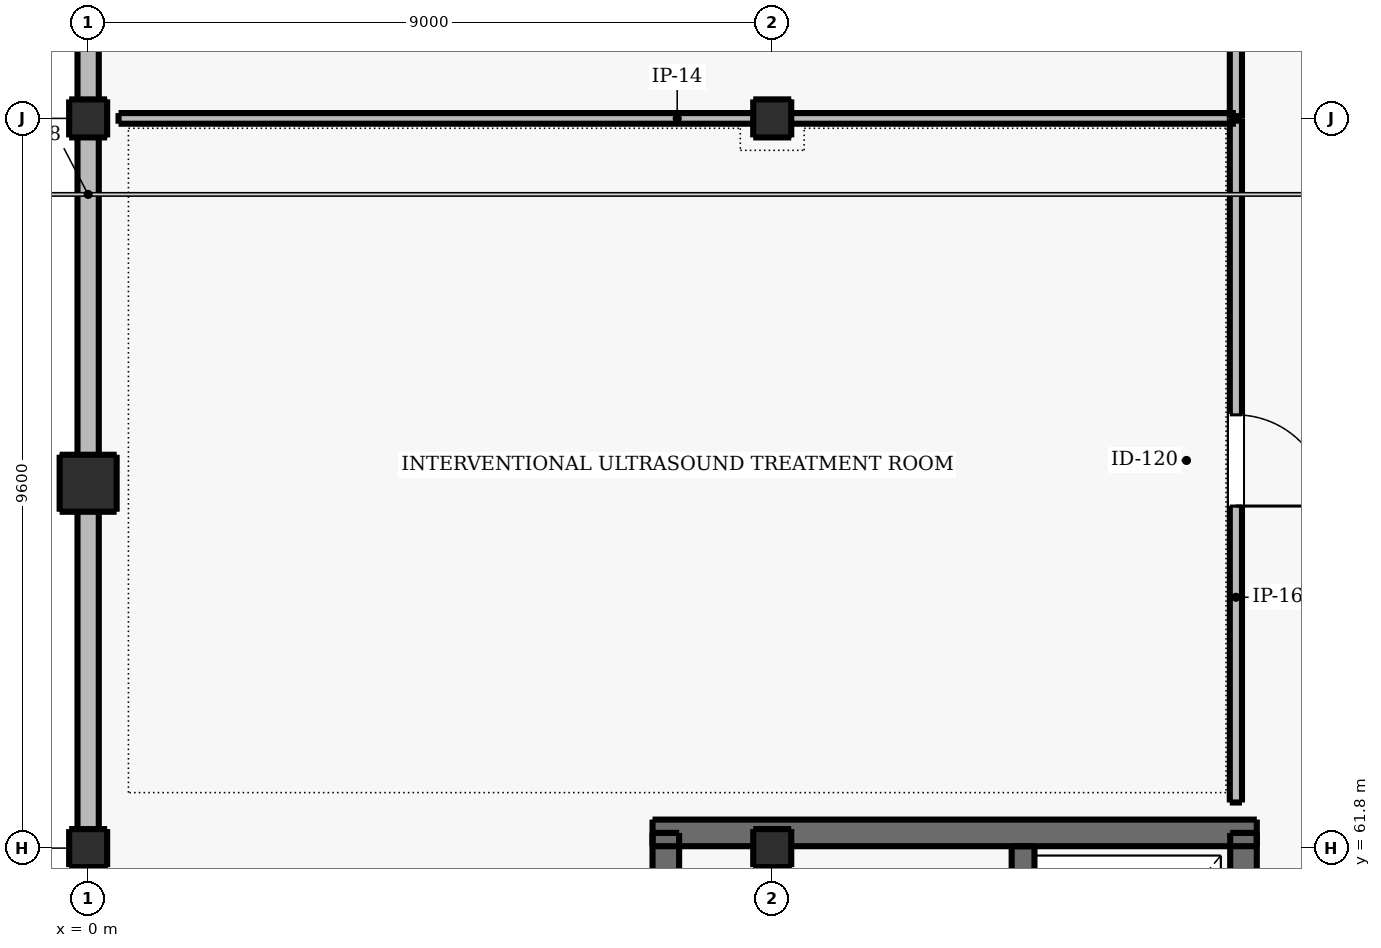
"""IFC4 building model, lengths in metres.
Left out: names, types, materials, properties, quantities, classifications, styles, units other than length and angle.
Written with IfcOpenShell. Run it as: python <this file> out.ifc"""

import sys

from ifc_helpers import new_model, si_unit, direction, frame, frame_2d, origin, origin_2d, place, context, subcontext, project, spatial, rectangle, extrude, element, fill, save


model = new_model("IFC4")
c1 = context("Model", 3, precision=1e-05, world=origin(), true_north=direction((0.0, 1.0)))
c2 = subcontext(c1, "Body", "Model", "MODEL_VIEW")
j1 = project(units=[si_unit("LENGTHUNIT", "METRE"), si_unit("PLANEANGLEUNIT", "RADIAN")], contexts=[c1])
p1 = place(None, origin())
s1 = spatial("IfcSite", under=j1, at=p1, CompositionType="ELEMENT")
p2 = place(p1, origin())
s2 = spatial("IfcBuilding", under=s1, at=p2, CompositionType="ELEMENT")
p3 = place(p2, frame((0.0, 0.0, 5.1)))
s3 = spatial("IfcBuildingStorey", under=s2, at=p3, CompositionType="ELEMENT", Elevation=5.1)
p4 = place(p3, frame((0.0, 61.8, 0.0), z_axis=(0.0, 0.0, 1.0), x_axis=(1.0, 0.0, 0.0)))
e1 = element("IfcColumn", 1, at=p4, inside=s3, PredefinedType="COLUMN", context=c2, shape_type="SweptSolid", body=[
    extrude(rectangle(XDim=0.5, YDim=0.5, at=origin_2d()), origin(), (0.0, 0.0, 1.0), 4.5),
])
p5 = place(p3, frame((0.0, 66.6, 0.0), z_axis=(0.0, 0.0, 1.0), x_axis=(1.0, 0.0, 0.0)))
e2 = element("IfcColumn", 2, at=p5, inside=s3, PredefinedType="PILASTER", context=c2, shape_type="SweptSolid", body=[
    extrude(rectangle(XDim=0.75, YDim=0.75, at=origin_2d()), origin(), (0.0, 0.0, 1.0), 4.5),
])
for number, where, z_axis, x_axis in (
    (3, (0.0, 71.4, 0.0), (0.0, 0.0, 1.0), (1.0, 0.0, 0.0)),
    (4, (9.0, 61.8, 0.0), (0.0, 0.0, 1.0), (1.0, 0.0, 0.0)),
    (5, (9.0, 71.4, 0.0), (0.0, 0.0, 1.0), (1.0, 0.0, 0.0)),
):
    element("IfcColumn", number, at=place(p3, frame(where, z_axis=z_axis, x_axis=x_axis)), inside=s3, PredefinedType="COLUMN", context=c2, shape_type="SweptSolid", body=[
        extrude(rectangle(XDim=0.5, YDim=0.5, at=origin_2d()), origin(), (0.0, 0.0, 1.0), 4.5),
    ])
p6 = place(p3, frame((7.425, 62.0, 0.0), z_axis=(0.0, 0.0, 1.0), x_axis=(1.0, 0.0, 0.0)))
e6 = element("IfcWall", 6, at=p6, inside=s3, PredefinedType="SHEAR", context=c2, shape_type="SweptSolid", body=[
    extrude(rectangle(XDim=7.95, YDim=0.35, at=frame_2d((3.975, 0.0))), origin(), (0.0, 0.0, 1.0), 4.5),
])
for number, where, z_axis, x_axis in (
    (7, (7.6, 54.8, 0.0), (0.0, 0.0, 1.0), (0.0, 1.0, 0.0)),
    (8, (15.2, 54.8, 0.0), (0.0, 0.0, 1.0), (0.0, 1.0, 0.0)),
):
    element("IfcWall", number, at=place(p3, frame(where, z_axis=z_axis, x_axis=x_axis)), inside=s3, PredefinedType="SHEAR", context=c2, shape_type="SweptSolid", body=[
        extrude(rectangle(XDim=7.2, YDim=0.35, at=frame_2d((3.6, 0.0))), origin(), (0.0, 0.0, 1.0), 4.5),
    ])
p7 = place(p3, frame((12.3, 58.5, 0.0), z_axis=(0.0, 0.0, 1.0), x_axis=(0.0, 1.0, 0.0)))
e9 = element("IfcWall", 9, at=p7, inside=s3, PredefinedType="SHEAR", context=c2, shape_type="SweptSolid", body=[
    extrude(rectangle(XDim=3.325, YDim=0.3, at=frame_2d((1.663, 0.0))), origin(), (0.0, 0.0, 1.0), 4.5),
])
p8 = place(p7, frame((1.113, 0.0, 0.0)))
e10 = element("IfcOpeningElement", 10, at=p8, cuts=e9, PredefinedType="OPENING", context=c2, shape_type="SweptSolid", body=[
    extrude(rectangle(XDim=1.1, YDim=2.15, at=frame_2d((0.55, 1.075))), frame((0.0, 0.16, 0.0), z_axis=(0.0, -1.0, 0.0), x_axis=(1.0, 0.0, 0.0)), (0.0, 0.0, 1.0), 0.32),
])
p9 = place(p3, frame((0.0, 45.0, 0.0), z_axis=(0.0, 0.0, 1.0), x_axis=(0.0, 1.0, 0.0)))
e11 = element("IfcWall", 11, at=p9, inside=s3, PredefinedType="SOLIDWALL", context=c2, shape_type="SweptSolid", body=[
    extrude(rectangle(XDim=50.8, YDim=0.28, at=frame_2d((25.4, 0.0))), origin(), (0.0, 0.0, 1.0), 3.28),
])
p10 = place(p3, frame((15.1, 62.4, 0.0), z_axis=(0.0, 0.0, 1.0), x_axis=(0.0, 1.0, 0.0)))
e12 = element("IfcWall", 12, at=p10, inside=s3, PredefinedType="PARTITIONING", context=c2, shape_type="SweptSolid", body=[
    extrude(rectangle(XDim=9.0, YDim=0.16, at=frame_2d((4.5, 0.0))), origin(), (0.0, 0.0, 1.0), 3.86),
])
p11 = place(p10, frame((3.9, 0.0, 0.0)))
e13 = element("IfcOpeningElement", 13, at=p11, cuts=e12, PredefinedType="OPENING", context=c2, shape_type="SweptSolid", body=[
    extrude(rectangle(XDim=1.2, YDim=2.2, at=frame_2d((0.6, 1.1))), frame((0.0, 0.09, 0.0), z_axis=(0.0, -1.0, 0.0), x_axis=(1.0, 0.0, 0.0)), (0.0, 0.0, 1.0), 0.18),
])
p12 = place(p3, frame((0.4, 71.4, 0.0), z_axis=(0.0, 0.0, 1.0), x_axis=(1.0, 0.0, 0.0)))
e14 = element("IfcWall", 14, at=p12, inside=s3, PredefinedType="PARTITIONING", context=c2, shape_type="SweptSolid", body=[
    extrude(rectangle(XDim=14.7, YDim=0.14, at=frame_2d((7.35, 0.0))), origin(), (0.0, 0.0, 1.0), 3.63),
])
p13 = place(p3, frame((15.1, 71.4, 0.0), z_axis=(0.0, 0.0, 1.0), x_axis=(0.0, 1.0, 0.0)))
e15 = element("IfcWall", 15, at=p13, inside=s3, PredefinedType="PARTITIONING", context=c2, shape_type="SweptSolid", body=[
    extrude(rectangle(XDim=9.0, YDim=0.16, at=frame_2d((4.5, 0.0))), origin(), (0.0, 0.0, 1.0), 3.73),
])
p14 = place(p13, frame((3.9, 0.0, 0.0)))
e16 = element("IfcOpeningElement", 16, at=p14, cuts=e15, PredefinedType="OPENING", context=c2, shape_type="SweptSolid", body=[
    extrude(rectangle(XDim=1.25, YDim=2.2, at=frame_2d((0.625, 1.1))), frame((0.0, 0.09, 0.0), z_axis=(0.0, -1.0, 0.0), x_axis=(1.0, 0.0, 0.0)), (0.0, 0.0, 1.0), 0.18),
])
p15 = place(p11, frame((1.2, 0.0, 0.0), z_axis=(0.0, 0.0, 1.0), x_axis=(-1.0, 0.0, 0.0)))
e17 = element("IfcDoor", 17, at=p15, inside=s3, OperationType="SINGLE_SWING_LEFT", PredefinedType="DOOR", context=c2, shape_type="SweptSolid", body=[
    extrude(rectangle(XDim=1.2, YDim=2.2, at=frame_2d((0.6, 1.1))), frame((0.0, 0.025, 0.0), z_axis=(0.0, -1.0, 0.0), x_axis=(1.0, 0.0, 0.0)), (0.0, 0.0, 1.0), 0.05),
])
fill(e13, e17)
save(model, sys.argv[1])
